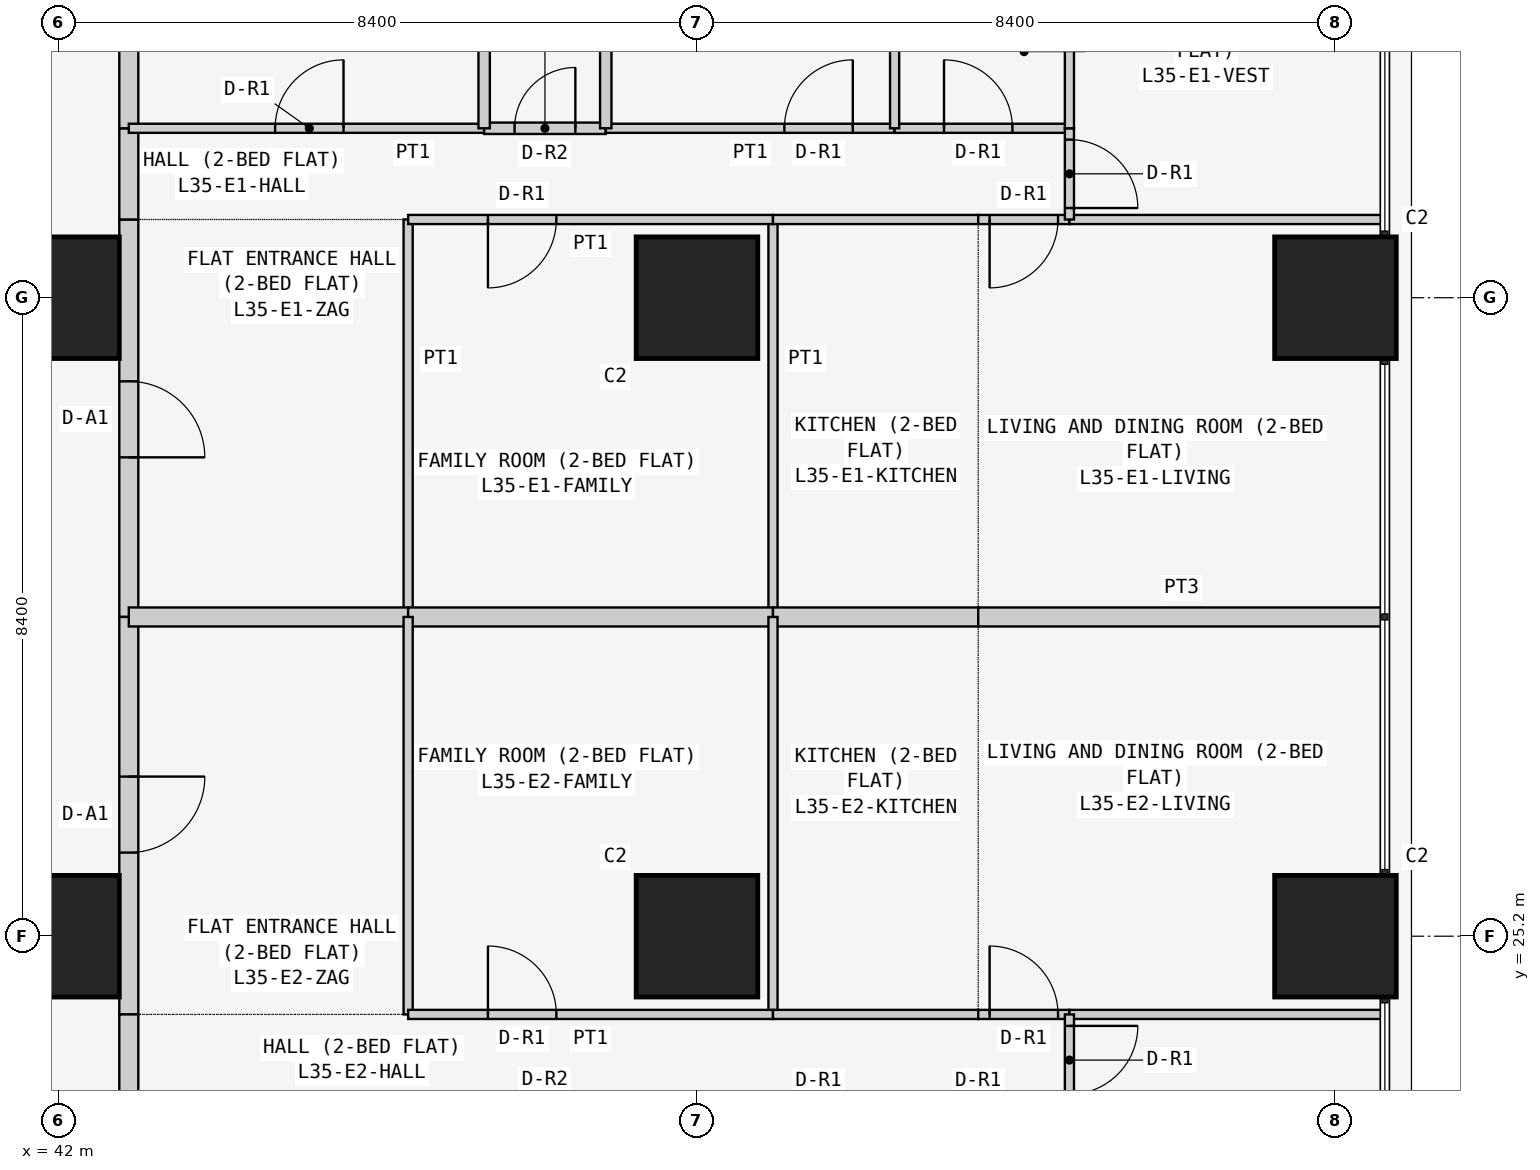
"""IFC4 building model, lengths in metres.
Left out: names, types, materials, properties, quantities, classifications, styles, units other than length and angle.
Written with IfcOpenShell. Run it as: python <this file> out.ifc"""

import sys

from ifc_helpers import new_model, si_unit, direction, frame, frame_2d, origin, origin_2d, place, context, subcontext, project, spatial, rectangle, extrude, element, fill, save


model = new_model("IFC4")
c1 = context("Model", 3, precision=1e-05, world=origin(), true_north=direction((0.0, 1.0)))
c2 = subcontext(c1, "Body", "Model", "MODEL_VIEW")
j1 = project(units=[si_unit("LENGTHUNIT", "METRE"), si_unit("PLANEANGLEUNIT", "RADIAN")], contexts=[c1])
p1 = place(None, origin())
s1 = spatial("IfcSite", under=j1, at=p1, CompositionType="ELEMENT")
p2 = place(p1, origin())
s2 = spatial("IfcBuilding", under=s1, at=p2, CompositionType="ELEMENT")
p3 = place(p2, frame((0.0, 0.0, 137.7)))
s3 = spatial("IfcBuildingStorey", under=s2, at=p3, CompositionType="ELEMENT", Elevation=137.7)
for number, where, z_axis, x_axis in (
    (1, (42.0, 25.2, 0.0), (0.0, 0.0, 1.0), (1.0, 0.0, 0.0)),
    (2, (42.0, 33.6, 0.0), (0.0, 0.0, 1.0), (1.0, 0.0, 0.0)),
    (3, (50.4, 25.2, 0.0), (0.0, 0.0, 1.0), (1.0, 0.0, 0.0)),
    (4, (50.4, 33.6, 0.0), (0.0, 0.0, 1.0), (1.0, 0.0, 0.0)),
    (5, (58.8, 25.2, 0.0), (0.0, 0.0, 1.0), (1.0, 0.0, 0.0)),
    (6, (58.8, 33.6, 0.0), (0.0, 0.0, 1.0), (1.0, 0.0, 0.0)),
):
    element("IfcColumn", number, at=place(p3, frame(where, z_axis=z_axis, x_axis=x_axis)), inside=s3, PredefinedType="COLUMN", context=c2, shape_type="SweptSolid", body=[
        extrude(rectangle(XDim=1.6, YDim=1.6, at=origin_2d()), origin(), (0.0, 0.0, 1.0), 3.6),
    ])
p4 = place(p3, frame((42.925, 34.629, 0.0), z_axis=(0.0, 0.0, 1.0), x_axis=(0.0, -1.0, 0.0)))
e7 = element("IfcWall", 7, at=p4, inside=s3, PredefinedType="PARTITIONING", context=c2, shape_type="SweptSolid", body=[
    extrude(rectangle(XDim=5.229, YDim=0.25, at=frame_2d((2.615, 0.0))), origin(), (0.0, 0.0, 1.0), 3.45),
])
p5 = place(p4, frame((2.129, 0.0, 0.0)))
e8 = element("IfcOpeningElement", 8, at=p5, cuts=e7, PredefinedType="OPENING", context=c2, shape_type="SweptSolid", body=[
    extrude(rectangle(XDim=1.0, YDim=2.1, at=frame_2d((0.5, 1.05))), frame((0.0, 0.135, 0.0), z_axis=(0.0, -1.0, 0.0), x_axis=(1.0, 0.0, 0.0)), (0.0, 0.0, 1.0), 0.27),
])
p6 = place(p3, frame((42.925, 35.829, 0.0), z_axis=(0.0, 0.0, 1.0), x_axis=(0.0, -1.0, 0.0)))
e9 = element("IfcWall", 9, at=p6, inside=s3, PredefinedType="PARTITIONING", context=c2, shape_type="SweptSolid", body=[
    extrude(rectangle(XDim=1.2, YDim=0.25, at=frame_2d((0.6, 0.0))), origin(), (0.0, 0.0, 1.0), 3.45),
])
p7 = place(p3, frame((42.925, 42.7, 0.0), z_axis=(0.0, 0.0, 1.0), x_axis=(0.0, -1.0, 0.0)))
e10 = element("IfcWall", 10, at=p7, inside=s3, PredefinedType="PARTITIONING", context=c2, shape_type="SweptSolid", body=[
    extrude(rectangle(XDim=6.871, YDim=0.25, at=frame_2d((3.436, 0.0))), origin(), (0.0, 0.0, 1.0), 3.45),
])
p8 = place(p3, frame((42.925, 29.4, 0.0), z_axis=(0.0, 0.0, 1.0), x_axis=(0.0, -1.0, 0.0)))
e11 = element("IfcWall", 11, at=p8, inside=s3, PredefinedType="PARTITIONING", context=c2, shape_type="SweptSolid", body=[
    extrude(rectangle(XDim=5.229, YDim=0.25, at=frame_2d((2.615, 0.0))), origin(), (0.0, 0.0, 1.0), 3.45),
])
p9 = place(p8, frame((2.1, 0.0, 0.0)))
e12 = element("IfcOpeningElement", 12, at=p9, cuts=e11, PredefinedType="OPENING", context=c2, shape_type="SweptSolid", body=[
    extrude(rectangle(XDim=1.0, YDim=2.1, at=frame_2d((0.5, 1.05))), frame((0.0, 0.135, 0.0), z_axis=(0.0, -1.0, 0.0), x_axis=(1.0, 0.0, 0.0)), (0.0, 0.0, 1.0), 0.27),
])
p10 = place(p3, frame((42.925, 24.171, 0.0), z_axis=(0.0, 0.0, 1.0), x_axis=(0.0, -1.0, 0.0)))
e13 = element("IfcWall", 13, at=p10, inside=s3, PredefinedType="PARTITIONING", context=c2, shape_type="SweptSolid", body=[
    extrude(rectangle(XDim=1.2, YDim=0.25, at=frame_2d((0.6, 0.0))), origin(), (0.0, 0.0, 1.0), 3.45),
])
p11 = place(p3, frame((46.6, 29.4, 0.0), z_axis=(0.0, 0.0, 1.0), x_axis=(0.0, 1.0, 0.0)))
e14 = element("IfcWall", 14, at=p11, inside=s3, PredefinedType="PARTITIONING", context=c2, shape_type="SweptSolid", body=[
    extrude(rectangle(XDim=5.229, YDim=0.12, at=frame_2d((2.615, 0.0))), origin(), (0.0, 0.0, 1.0), 3.45),
])
p12 = place(p3, frame((42.925, 29.4, 0.0), z_axis=(0.0, 0.0, 1.0), x_axis=(1.0, 0.0, 0.0)))
e15 = element("IfcWall", 15, at=p12, inside=s3, PredefinedType="PARTITIONING", context=c2, shape_type="SweptSolid", body=[
    extrude(rectangle(XDim=3.675, YDim=0.25, at=frame_2d((1.837, 0.0))), origin(), (0.0, 0.0, 1.0), 3.45),
])
p13 = place(p3, frame((51.4, 29.4, 0.0), z_axis=(0.0, 0.0, 1.0), x_axis=(0.0, 1.0, 0.0)))
e16 = element("IfcWall", 16, at=p13, inside=s3, PredefinedType="PARTITIONING", context=c2, shape_type="SweptSolid", body=[
    extrude(rectangle(XDim=5.229, YDim=0.12, at=frame_2d((2.615, 0.0))), origin(), (0.0, 0.0, 1.0), 3.45),
])
p14 = place(p3, frame((51.4, 34.629, 0.0), z_axis=(0.0, 0.0, 1.0), x_axis=(-1.0, 0.0, 0.0)))
e17 = element("IfcWall", 17, at=p14, inside=s3, PredefinedType="PARTITIONING", context=c2, shape_type="SweptSolid", body=[
    extrude(rectangle(XDim=4.8, YDim=0.12, at=frame_2d((2.4, 0.0))), origin(), (0.0, 0.0, 1.0), 3.45),
])
p15 = place(p14, frame((2.85, 0.0, 0.0)))
e18 = element("IfcOpeningElement", 18, at=p15, cuts=e17, PredefinedType="OPENING", context=c2, shape_type="SweptSolid", body=[
    extrude(rectangle(XDim=0.9, YDim=2.1, at=frame_2d((0.45, 1.05))), frame((0.0, 0.07, 0.0), z_axis=(0.0, -1.0, 0.0), x_axis=(1.0, 0.0, 0.0)), (0.0, 0.0, 1.0), 0.14),
])
p16 = place(p3, frame((46.6, 29.4, 0.0), z_axis=(0.0, 0.0, 1.0), x_axis=(1.0, 0.0, 0.0)))
e19 = element("IfcWall", 19, at=p16, inside=s3, PredefinedType="PARTITIONING", context=c2, shape_type="SweptSolid", body=[
    extrude(rectangle(XDim=4.8, YDim=0.25, at=frame_2d((2.4, 0.0))), origin(), (0.0, 0.0, 1.0), 3.45),
])
p17 = place(p3, frame((54.1, 34.629, 0.0), z_axis=(0.0, 0.0, 1.0), x_axis=(-1.0, 0.0, 0.0)))
e20 = element("IfcWall", 20, at=p17, inside=s3, PredefinedType="PARTITIONING", context=c2, shape_type="SweptSolid", body=[
    extrude(rectangle(XDim=2.7, YDim=0.12, at=frame_2d((1.35, 0.0))), origin(), (0.0, 0.0, 1.0), 3.45),
])
p18 = place(p3, frame((51.4, 29.4, 0.0), z_axis=(0.0, 0.0, 1.0), x_axis=(1.0, 0.0, 0.0)))
e21 = element("IfcWall", 21, at=p18, inside=s3, PredefinedType="PARTITIONING", context=c2, shape_type="SweptSolid", body=[
    extrude(rectangle(XDim=2.7, YDim=0.25, at=frame_2d((1.35, 0.0))), origin(), (0.0, 0.0, 1.0), 3.45),
])
p19 = place(p3, frame((55.3, 34.629, 0.0), z_axis=(0.0, 0.0, 1.0), x_axis=(-1.0, 0.0, 0.0)))
e22 = element("IfcWall", 22, at=p19, inside=s3, PredefinedType="PARTITIONING", context=c2, shape_type="SweptSolid", body=[
    extrude(rectangle(XDim=1.2, YDim=0.12, at=frame_2d((0.6, 0.0))), origin(), (0.0, 0.0, 1.0), 3.45),
])
p20 = place(p19, frame((0.15, 0.0, 0.0)))
e23 = element("IfcOpeningElement", 23, at=p20, cuts=e22, PredefinedType="OPENING", context=c2, shape_type="SweptSolid", body=[
    extrude(rectangle(XDim=0.9, YDim=2.1, at=frame_2d((0.45, 1.05))), frame((0.0, 0.07, 0.0), z_axis=(0.0, -1.0, 0.0), x_axis=(1.0, 0.0, 0.0)), (0.0, 0.0, 1.0), 0.14),
])
p21 = place(p3, frame((59.45, 34.629, 0.0), z_axis=(0.0, 0.0, 1.0), x_axis=(-1.0, 0.0, 0.0)))
e24 = element("IfcWall", 24, at=p21, inside=s3, PredefinedType="PARTITIONING", context=c2, shape_type="SweptSolid", body=[
    extrude(rectangle(XDim=4.15, YDim=0.12, at=frame_2d((2.075, 0.0))), origin(), (0.0, 0.0, 1.0), 3.45),
])
p22 = place(p3, frame((54.1, 29.4, 0.0), z_axis=(0.0, 0.0, 1.0), x_axis=(1.0, 0.0, 0.0)))
e25 = element("IfcWall", 25, at=p22, inside=s3, PredefinedType="PARTITIONING", context=c2, shape_type="SweptSolid", body=[
    extrude(rectangle(XDim=5.35, YDim=0.25, at=frame_2d((2.675, 0.0))), origin(), (0.0, 0.0, 1.0), 3.45),
])
p23 = place(p3, frame((47.6, 35.829, 0.0), z_axis=(0.0, 0.0, 1.0), x_axis=(-1.0, 0.0, 0.0)))
e26 = element("IfcWall", 26, at=p23, inside=s3, PredefinedType="PARTITIONING", context=c2, shape_type="SweptSolid", body=[
    extrude(rectangle(XDim=4.675, YDim=0.12, at=frame_2d((2.337, 0.0))), origin(), (0.0, 0.0, 1.0), 3.45),
])
p24 = place(p23, frame((1.85, 0.0, 0.0)))
e27 = element("IfcOpeningElement", 27, at=p24, cuts=e26, PredefinedType="OPENING", context=c2, shape_type="SweptSolid", body=[
    extrude(rectangle(XDim=0.9, YDim=2.1, at=frame_2d((0.45, 1.05))), frame((0.0, 0.07, 0.0), z_axis=(0.0, -1.0, 0.0), x_axis=(1.0, 0.0, 0.0)), (0.0, 0.0, 1.0), 0.14),
])
p25 = place(p3, frame((49.2, 35.829, 0.0), z_axis=(0.0, 0.0, 1.0), x_axis=(-1.0, 0.0, 0.0)))
e28 = element("IfcWall", 28, at=p25, inside=s3, PredefinedType="PARTITIONING", context=c2, shape_type="SweptSolid", body=[
    extrude(rectangle(XDim=1.6, YDim=0.15, at=frame_2d((0.8, 0.0))), origin(), (0.0, 0.0, 1.0), 3.45),
])
p26 = place(p25, frame((0.4, 0.0, 0.0)))
e29 = element("IfcOpeningElement", 29, at=p26, cuts=e28, PredefinedType="OPENING", context=c2, shape_type="SweptSolid", body=[
    extrude(rectangle(XDim=0.8, YDim=2.1, at=frame_2d((0.4, 1.05))), frame((0.0, 0.085, 0.0), z_axis=(0.0, -1.0, 0.0), x_axis=(1.0, 0.0, 0.0)), (0.0, 0.0, 1.0), 0.17),
])
p27 = place(p3, frame((53.0, 35.829, 0.0), z_axis=(0.0, 0.0, 1.0), x_axis=(-1.0, 0.0, 0.0)))
e30 = element("IfcWall", 30, at=p27, inside=s3, PredefinedType="PARTITIONING", context=c2, shape_type="SweptSolid", body=[
    extrude(rectangle(XDim=3.8, YDim=0.12, at=frame_2d((1.9, 0.0))), origin(), (0.0, 0.0, 1.0), 3.45),
])
p28 = place(p27, frame((0.55, 0.0, 0.0)))
e31 = element("IfcOpeningElement", 31, at=p28, cuts=e30, PredefinedType="OPENING", context=c2, shape_type="SweptSolid", body=[
    extrude(rectangle(XDim=0.9, YDim=2.1, at=frame_2d((0.45, 1.05))), frame((0.0, 0.07, 0.0), z_axis=(0.0, -1.0, 0.0), x_axis=(1.0, 0.0, 0.0)), (0.0, 0.0, 1.0), 0.14),
])
p29 = place(p3, frame((55.3, 35.829, 0.0), z_axis=(0.0, 0.0, 1.0), x_axis=(-1.0, 0.0, 0.0)))
e32 = element("IfcWall", 32, at=p29, inside=s3, PredefinedType="PARTITIONING", context=c2, shape_type="SweptSolid", body=[
    extrude(rectangle(XDim=2.3, YDim=0.12, at=frame_2d((1.15, 0.0))), origin(), (0.0, 0.0, 1.0), 3.45),
])
p30 = place(p29, frame((0.75, 0.0, 0.0)))
e33 = element("IfcOpeningElement", 33, at=p30, cuts=e32, PredefinedType="OPENING", context=c2, shape_type="SweptSolid", body=[
    extrude(rectangle(XDim=0.9, YDim=2.1, at=frame_2d((0.45, 1.05))), frame((0.0, 0.07, 0.0), z_axis=(0.0, -1.0, 0.0), x_axis=(1.0, 0.0, 0.0)), (0.0, 0.0, 1.0), 0.14),
])
p31 = place(p3, frame((55.3, 34.629, 0.0), z_axis=(0.0, 0.0, 1.0), x_axis=(0.0, 1.0, 0.0)))
e34 = element("IfcWall", 34, at=p31, inside=s3, PredefinedType="PARTITIONING", context=c2, shape_type="SweptSolid", body=[
    extrude(rectangle(XDim=1.2, YDim=0.12, at=frame_2d((0.6, 0.0))), origin(), (0.0, 0.0, 1.0), 3.45),
])
p32 = place(p31, frame((0.151, 0.0, 0.0)))
e35 = element("IfcOpeningElement", 35, at=p32, cuts=e34, PredefinedType="OPENING", context=c2, shape_type="SweptSolid", body=[
    extrude(rectangle(XDim=0.9, YDim=2.1, at=frame_2d((0.45, 1.05))), frame((0.0, 0.07, 0.0), z_axis=(0.0, -1.0, 0.0), x_axis=(1.0, 0.0, 0.0)), (0.0, 0.0, 1.0), 0.14),
])
for number, where, z_axis, x_axis in (
    (36, (47.6, 35.829, 0.0), (0.0, 0.0, 1.0), (0.0, 1.0, 0.0)),
    (37, (49.2, 35.829, 0.0), (0.0, 0.0, 1.0), (0.0, 1.0, 0.0)),
):
    element("IfcWall", number, at=place(p3, frame(where, z_axis=z_axis, x_axis=x_axis)), inside=s3, PredefinedType="PARTITIONING", context=c2, shape_type="SweptSolid", body=[
        extrude(rectangle(XDim=6.871, YDim=0.15, at=frame_2d((3.436, 0.0))), origin(), (0.0, 0.0, 1.0), 3.45),
    ])
for number, where, z_axis, x_axis in (
    (38, (53.0, 37.829, 0.0), (0.0, 0.0, 1.0), (0.0, -1.0, 0.0)),
    (39, (55.3, 35.829, 0.0), (0.0, 0.0, 1.0), (0.0, 1.0, 0.0)),
):
    element("IfcWall", number, at=place(p3, frame(where, z_axis=z_axis, x_axis=x_axis)), inside=s3, PredefinedType="PARTITIONING", context=c2, shape_type="SweptSolid", body=[
        extrude(rectangle(XDim=2.0, YDim=0.12, at=frame_2d((1.0, 0.0))), origin(), (0.0, 0.0, 1.0), 3.45),
    ])
for number, where, z_axis, x_axis in (
    (40, (46.6, 29.4, 0.0), (0.0, 0.0, 1.0), (0.0, -1.0, 0.0)),
    (41, (51.4, 29.4, 0.0), (0.0, 0.0, 1.0), (0.0, -1.0, 0.0)),
):
    element("IfcWall", number, at=place(p3, frame(where, z_axis=z_axis, x_axis=x_axis)), inside=s3, PredefinedType="PARTITIONING", context=c2, shape_type="SweptSolid", body=[
        extrude(rectangle(XDim=5.229, YDim=0.12, at=frame_2d((2.615, 0.0))), origin(), (0.0, 0.0, 1.0), 3.45),
    ])
p33 = place(p3, frame((51.4, 24.171, 0.0), z_axis=(0.0, 0.0, 1.0), x_axis=(-1.0, 0.0, 0.0)))
e42 = element("IfcWall", 42, at=p33, inside=s3, PredefinedType="PARTITIONING", context=c2, shape_type="SweptSolid", body=[
    extrude(rectangle(XDim=4.8, YDim=0.12, at=frame_2d((2.4, 0.0))), origin(), (0.0, 0.0, 1.0), 3.45),
])
p34 = place(p33, frame((2.85, 0.0, 0.0)))
e43 = element("IfcOpeningElement", 43, at=p34, cuts=e42, PredefinedType="OPENING", context=c2, shape_type="SweptSolid", body=[
    extrude(rectangle(XDim=0.9, YDim=2.1, at=frame_2d((0.45, 1.05))), frame((0.0, 0.07, 0.0), z_axis=(0.0, -1.0, 0.0), x_axis=(1.0, 0.0, 0.0)), (0.0, 0.0, 1.0), 0.14),
])
p35 = place(p3, frame((54.1, 24.171, 0.0), z_axis=(0.0, 0.0, 1.0), x_axis=(-1.0, 0.0, 0.0)))
e44 = element("IfcWall", 44, at=p35, inside=s3, PredefinedType="PARTITIONING", context=c2, shape_type="SweptSolid", body=[
    extrude(rectangle(XDim=2.7, YDim=0.12, at=frame_2d((1.35, 0.0))), origin(), (0.0, 0.0, 1.0), 3.45),
])
p36 = place(p3, frame((55.3, 24.171, 0.0), z_axis=(0.0, 0.0, 1.0), x_axis=(-1.0, 0.0, 0.0)))
e45 = element("IfcWall", 45, at=p36, inside=s3, PredefinedType="PARTITIONING", context=c2, shape_type="SweptSolid", body=[
    extrude(rectangle(XDim=1.2, YDim=0.12, at=frame_2d((0.6, 0.0))), origin(), (0.0, 0.0, 1.0), 3.45),
])
p37 = place(p36, frame((0.15, 0.0, 0.0)))
e46 = element("IfcOpeningElement", 46, at=p37, cuts=e45, PredefinedType="OPENING", context=c2, shape_type="SweptSolid", body=[
    extrude(rectangle(XDim=0.9, YDim=2.1, at=frame_2d((0.45, 1.05))), frame((0.0, 0.07, 0.0), z_axis=(0.0, -1.0, 0.0), x_axis=(1.0, 0.0, 0.0)), (0.0, 0.0, 1.0), 0.14),
])
p38 = place(p3, frame((59.45, 24.171, 0.0), z_axis=(0.0, 0.0, 1.0), x_axis=(-1.0, 0.0, 0.0)))
e47 = element("IfcWall", 47, at=p38, inside=s3, PredefinedType="PARTITIONING", context=c2, shape_type="SweptSolid", body=[
    extrude(rectangle(XDim=4.15, YDim=0.12, at=frame_2d((2.075, 0.0))), origin(), (0.0, 0.0, 1.0), 3.45),
])
p39 = place(p3, frame((55.3, 24.171, 0.0), z_axis=(0.0, 0.0, 1.0), x_axis=(0.0, -1.0, 0.0)))
e48 = element("IfcWall", 48, at=p39, inside=s3, PredefinedType="PARTITIONING", context=c2, shape_type="SweptSolid", body=[
    extrude(rectangle(XDim=1.2, YDim=0.12, at=frame_2d((0.6, 0.0))), origin(), (0.0, 0.0, 1.0), 3.45),
])
p40 = place(p39, frame((0.151, 0.0, 0.0)))
e49 = element("IfcOpeningElement", 49, at=p40, cuts=e48, PredefinedType="OPENING", context=c2, shape_type="SweptSolid", body=[
    extrude(rectangle(XDim=0.9, YDim=2.1, at=frame_2d((0.45, 1.05))), frame((0.0, 0.07, 0.0), z_axis=(0.0, -1.0, 0.0), x_axis=(1.0, 0.0, 0.0)), (0.0, 0.0, 1.0), 0.14),
])
p41 = place(p5, origin())
e50 = element("IfcDoor", 50, at=p41, inside=s3, OperationType="SINGLE_SWING_RIGHT", PredefinedType="DOOR", context=c2, shape_type="SweptSolid", body=[
    extrude(rectangle(XDim=1.0, YDim=2.1, at=frame_2d((0.5, 1.05))), frame((0.0, 0.025, 0.0), z_axis=(0.0, -1.0, 0.0), x_axis=(1.0, 0.0, 0.0)), (0.0, 0.0, 1.0), 0.05),
])
fill(e8, e50)
p42 = place(p15, origin())
e51 = element("IfcDoor", 51, at=p42, inside=s3, OperationType="SINGLE_SWING_RIGHT", PredefinedType="DOOR", context=c2, shape_type="SweptSolid", body=[
    extrude(rectangle(XDim=0.9, YDim=2.1, at=frame_2d((0.45, 1.05))), frame((0.0, 0.025, 0.0), z_axis=(0.0, -1.0, 0.0), x_axis=(1.0, 0.0, 0.0)), (0.0, 0.0, 1.0), 0.05),
])
fill(e18, e51)
p43 = place(p20, origin())
e52 = element("IfcDoor", 52, at=p43, inside=s3, OperationType="SINGLE_SWING_RIGHT", PredefinedType="DOOR", context=c2, shape_type="SweptSolid", body=[
    extrude(rectangle(XDim=0.9, YDim=2.1, at=frame_2d((0.45, 1.05))), frame((0.0, 0.025, 0.0), z_axis=(0.0, -1.0, 0.0), x_axis=(1.0, 0.0, 0.0)), (0.0, 0.0, 1.0), 0.05),
])
fill(e23, e52)
p44 = place(p24, frame((0.9, 0.0, 0.0), z_axis=(0.0, 0.0, 1.0), x_axis=(-1.0, 0.0, 0.0)))
e53 = element("IfcDoor", 53, at=p44, inside=s3, OperationType="SINGLE_SWING_RIGHT", PredefinedType="DOOR", context=c2, shape_type="SweptSolid", body=[
    extrude(rectangle(XDim=0.9, YDim=2.1, at=frame_2d((0.45, 1.05))), frame((0.0, 0.025, 0.0), z_axis=(0.0, -1.0, 0.0), x_axis=(1.0, 0.0, 0.0)), (0.0, 0.0, 1.0), 0.05),
])
fill(e27, e53)
p45 = place(p26, frame((0.8, 0.0, 0.0), z_axis=(0.0, 0.0, 1.0), x_axis=(-1.0, 0.0, 0.0)))
e54 = element("IfcDoor", 54, at=p45, inside=s3, OperationType="SINGLE_SWING_RIGHT", PredefinedType="DOOR", context=c2, shape_type="SweptSolid", body=[
    extrude(rectangle(XDim=0.8, YDim=2.1, at=frame_2d((0.4, 1.05))), frame((0.0, 0.025, 0.0), z_axis=(0.0, -1.0, 0.0), x_axis=(1.0, 0.0, 0.0)), (0.0, 0.0, 1.0), 0.05),
])
fill(e29, e54)
p46 = place(p28, frame((0.9, 0.0, 0.0), z_axis=(0.0, 0.0, 1.0), x_axis=(-1.0, 0.0, 0.0)))
e55 = element("IfcDoor", 55, at=p46, inside=s3, OperationType="SINGLE_SWING_RIGHT", PredefinedType="DOOR", context=c2, shape_type="SweptSolid", body=[
    extrude(rectangle(XDim=0.9, YDim=2.1, at=frame_2d((0.45, 1.05))), frame((0.0, 0.025, 0.0), z_axis=(0.0, -1.0, 0.0), x_axis=(1.0, 0.0, 0.0)), (0.0, 0.0, 1.0), 0.05),
])
fill(e31, e55)
p47 = place(p30, frame((0.9, 0.0, 0.0), z_axis=(0.0, 0.0, 1.0), x_axis=(-1.0, 0.0, 0.0)))
e56 = element("IfcDoor", 56, at=p47, inside=s3, OperationType="SINGLE_SWING_LEFT", PredefinedType="DOOR", context=c2, shape_type="SweptSolid", body=[
    extrude(rectangle(XDim=0.9, YDim=2.1, at=frame_2d((0.45, 1.05))), frame((0.0, 0.025, 0.0), z_axis=(0.0, -1.0, 0.0), x_axis=(1.0, 0.0, 0.0)), (0.0, 0.0, 1.0), 0.05),
])
fill(e33, e56)
p48 = place(p32, frame((0.9, 0.0, 0.0), z_axis=(0.0, 0.0, 1.0), x_axis=(-1.0, 0.0, 0.0)))
e57 = element("IfcDoor", 57, at=p48, inside=s3, OperationType="SINGLE_SWING_RIGHT", PredefinedType="DOOR", context=c2, shape_type="SweptSolid", body=[
    extrude(rectangle(XDim=0.9, YDim=2.1, at=frame_2d((0.45, 1.05))), frame((0.0, 0.025, 0.0), z_axis=(0.0, -1.0, 0.0), x_axis=(1.0, 0.0, 0.0)), (0.0, 0.0, 1.0), 0.05),
])
fill(e35, e57)
p49 = place(p9, origin())
e58 = element("IfcDoor", 58, at=p49, inside=s3, OperationType="SINGLE_SWING_LEFT", PredefinedType="DOOR", context=c2, shape_type="SweptSolid", body=[
    extrude(rectangle(XDim=1.0, YDim=2.1, at=frame_2d((0.5, 1.05))), frame((0.0, 0.025, 0.0), z_axis=(0.0, -1.0, 0.0), x_axis=(1.0, 0.0, 0.0)), (0.0, 0.0, 1.0), 0.05),
])
fill(e12, e58)
p50 = place(p34, frame((0.9, 0.0, 0.0), z_axis=(0.0, 0.0, 1.0), x_axis=(-1.0, 0.0, 0.0)))
e59 = element("IfcDoor", 59, at=p50, inside=s3, OperationType="SINGLE_SWING_LEFT", PredefinedType="DOOR", context=c2, shape_type="SweptSolid", body=[
    extrude(rectangle(XDim=0.9, YDim=2.1, at=frame_2d((0.45, 1.05))), frame((0.0, 0.025, 0.0), z_axis=(0.0, -1.0, 0.0), x_axis=(1.0, 0.0, 0.0)), (0.0, 0.0, 1.0), 0.05),
])
fill(e43, e59)
p51 = place(p37, frame((0.9, 0.0, 0.0), z_axis=(0.0, 0.0, 1.0), x_axis=(-1.0, 0.0, 0.0)))
e60 = element("IfcDoor", 60, at=p51, inside=s3, OperationType="SINGLE_SWING_LEFT", PredefinedType="DOOR", context=c2, shape_type="SweptSolid", body=[
    extrude(rectangle(XDim=0.9, YDim=2.1, at=frame_2d((0.45, 1.05))), frame((0.0, 0.025, 0.0), z_axis=(0.0, -1.0, 0.0), x_axis=(1.0, 0.0, 0.0)), (0.0, 0.0, 1.0), 0.05),
])
fill(e46, e60)
p52 = place(p40, origin())
e61 = element("IfcDoor", 61, at=p52, inside=s3, OperationType="SINGLE_SWING_LEFT", PredefinedType="DOOR", context=c2, shape_type="SweptSolid", body=[
    extrude(rectangle(XDim=0.9, YDim=2.1, at=frame_2d((0.45, 1.05))), frame((0.0, 0.025, 0.0), z_axis=(0.0, -1.0, 0.0), x_axis=(1.0, 0.0, 0.0)), (0.0, 0.0, 1.0), 0.05),
])
fill(e49, e61)
save(model, sys.argv[1])
